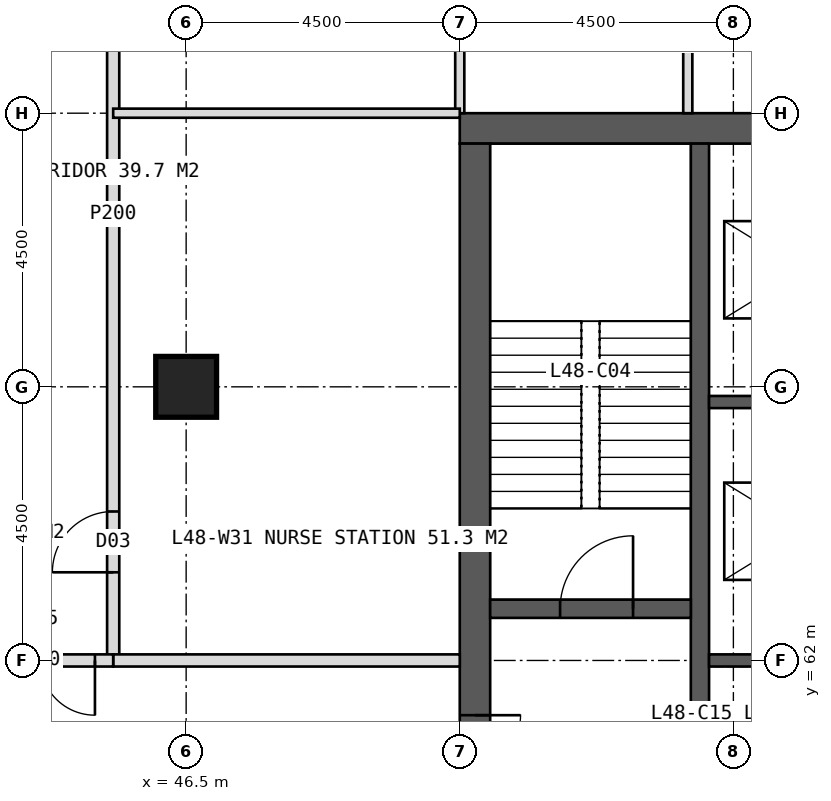
"""IFC4 building model, lengths in metres.
Left out: names, types, materials, properties, quantities, classifications, styles, units other than length and angle.
Written with IfcOpenShell. Run it as: python <this file> out.ifc"""

import sys

from ifc_helpers import new_model, si_unit, direction, frame, frame_2d, origin, origin_2d, place, context, subcontext, project, spatial, rectangle, hollow_rectangle, extrude, element, fill, save


model = new_model("IFC4")
c1 = context("Model", 3, precision=1e-05, world=origin(), true_north=direction((0.0, 1.0)))
c2 = subcontext(c1, "Body", "Model", "MODEL_VIEW")
j1 = project(units=[si_unit("LENGTHUNIT", "METRE"), si_unit("PLANEANGLEUNIT", "RADIAN")], contexts=[c1])
p1 = place(None, origin())
s1 = spatial("IfcSite", under=j1, at=p1, CompositionType="ELEMENT")
p2 = place(p1, origin())
s2 = spatial("IfcBuilding", under=s1, at=p2, CompositionType="ELEMENT")
p3 = place(p2, frame((0.0, 0.0, 201.0)))
s3 = spatial("IfcBuildingStorey", under=s2, at=p3, CompositionType="ELEMENT", Elevation=201.0)
p4 = place(p3, frame((51.0, 70.75, 0.0), z_axis=(0.0, 0.0, 1.0), x_axis=(1.0, 0.0, 0.0)))
e1 = element("IfcWall", 1, at=p4, inside=s3, PredefinedType="SHEAR", context=c2, shape_type="SweptSolid", body=[
    extrude(rectangle(XDim=18.0, YDim=0.5, at=frame_2d((9.0, 0.0))), origin(), (0.0, 0.0, 1.0), 4.0),
])
p5 = place(p4, frame((8.1, 0.0, 0.0)))
e2 = element("IfcOpeningElement", 2, at=p5, cuts=e1, PredefinedType="OPENING", context=c2, shape_type="SweptSolid", body=[
    extrude(rectangle(XDim=1.8, YDim=2.2, at=frame_2d((0.9, 1.1))), frame((0.0, 0.26, 0.0), z_axis=(0.0, -1.0, 0.0), x_axis=(1.0, 0.0, 0.0)), (0.0, 0.0, 1.0), 0.52),
])
p6 = place(p3, frame((51.25, 53.5, 0.0), z_axis=(0.0, 0.0, 1.0), x_axis=(0.0, 1.0, 0.0)))
e3 = element("IfcWall", 3, at=p6, inside=s3, PredefinedType="SHEAR", context=c2, shape_type="SweptSolid", body=[
    extrude(rectangle(XDim=17.0, YDim=0.5, at=frame_2d((8.5, 0.0))), origin(), (0.0, 0.0, 1.0), 4.0),
])
p7 = place(p6, frame((6.1, 0.0, 0.0)))
e4 = element("IfcOpeningElement", 4, at=p7, cuts=e3, PredefinedType="OPENING", context=c2, shape_type="SweptSolid", body=[
    extrude(rectangle(XDim=1.5, YDim=2.2, at=frame_2d((0.75, 1.1))), frame((0.0, 0.26, 0.0), z_axis=(0.0, -1.0, 0.0), x_axis=(1.0, 0.0, 0.0)), (0.0, 0.0, 1.0), 0.52),
])
p8 = place(p3, frame((54.95, 53.5, 0.0), z_axis=(0.0, 0.0, 1.0), x_axis=(0.0, 1.0, 0.0)))
e5 = element("IfcWall", 5, at=p8, inside=s3, PredefinedType="SHEAR", context=c2, shape_type="SweptSolid", body=[
    extrude(rectangle(XDim=17.0, YDim=0.3, at=frame_2d((8.5, 0.0))), origin(), (0.0, 0.0, 1.0), 4.0),
])
for number, where, z_axis, x_axis in (
    (6, (55.1, 62.0, 0.0), (0.0, 0.0, 1.0), (1.0, 0.0, 0.0)),
    (7, (55.1, 66.25, 0.0), (0.0, 0.0, 1.0), (1.0, 0.0, 0.0)),
):
    element("IfcWall", number, at=place(p3, frame(where, z_axis=z_axis, x_axis=x_axis)), inside=s3, PredefinedType="SHEAR", context=c2, shape_type="SweptSolid", body=[
        extrude(rectangle(XDim=3.05, YDim=0.2, at=frame_2d((1.525, 0.0))), origin(), (0.0, 0.0, 1.0), 4.0),
    ])
p9 = place(p3, frame((51.5, 62.85, 0.0), z_axis=(0.0, 0.0, 1.0), x_axis=(1.0, 0.0, 0.0)))
e8 = element("IfcWall", 8, at=p9, inside=s3, PredefinedType="SHEAR", context=c2, shape_type="SweptSolid", body=[
    extrude(rectangle(XDim=3.3, YDim=0.3, at=frame_2d((1.65, 0.0))), origin(), (0.0, 0.0, 1.0), 4.0),
])
p10 = place(p9, frame((1.15, 0.0, 0.0)))
e9 = element("IfcOpeningElement", 9, at=p10, cuts=e8, PredefinedType="OPENING", context=c2, shape_type="SweptSolid", body=[
    extrude(rectangle(XDim=1.2, YDim=2.1, at=frame_2d((0.6, 1.05))), frame((0.0, 0.16, 0.0), z_axis=(0.0, -1.0, 0.0), x_axis=(1.0, 0.0, 0.0)), (0.0, 0.0, 1.0), 0.32),
])
p11 = place(p3, frame((46.5, 66.5, 0.0), z_axis=(0.0, 0.0, 1.0), x_axis=(1.0, 0.0, 0.0)))
e10 = element("IfcColumn", 10, at=p11, inside=s3, PredefinedType="COLUMN", context=c2, shape_type="SweptSolid", body=[
    extrude(hollow_rectangle(XDim=1.0, YDim=1.0, WallThickness=0.1, at=origin_2d()), origin(), (0.0, 0.0, 1.0), 4.0),
])
p12 = place(p3, frame((51.0, 71.0, 0.0), z_axis=(0.0, 0.0, 1.0), x_axis=(0.0, 1.0, 0.0)))
e11 = element("IfcWall", 11, at=p12, inside=s3, PredefinedType="PARTITIONING", context=c2, shape_type="SweptSolid", body=[
    extrude(rectangle(XDim=5.7, YDim=0.15, at=frame_2d((2.85, 0.0))), origin(), (0.0, 0.0, 1.0), 3.75),
])
p13 = place(p3, frame((54.75, 71.0, 0.0), z_axis=(0.0, 0.0, 1.0), x_axis=(0.0, 1.0, 0.0)))
e12 = element("IfcWall", 12, at=p13, inside=s3, PredefinedType="PARTITIONING", context=c2, shape_type="SweptSolid", body=[
    extrude(rectangle(XDim=2.4, YDim=0.15, at=frame_2d((1.2, 0.0))), origin(), (0.0, 0.0, 1.0), 3.75),
])
p14 = place(p3, frame((45.3, 62.0, 0.0), z_axis=(0.0, 0.0, 1.0), x_axis=(0.0, 1.0, 0.0)))
e13 = element("IfcWall", 13, at=p14, inside=s3, PredefinedType="PARTITIONING", context=c2, shape_type="SweptSolid", body=[
    extrude(rectangle(XDim=14.7, YDim=0.2, at=frame_2d((7.35, 0.0))), origin(), (0.0, 0.0, 1.0), 3.75),
])
p15 = place(p14, frame((1.45, 0.0, 0.0)))
e14 = element("IfcOpeningElement", 14, at=p15, cuts=e13, PredefinedType="OPENING", context=c2, shape_type="SweptSolid", body=[
    extrude(rectangle(XDim=1.0, YDim=2.1, at=frame_2d((0.5, 1.05))), frame((0.0, 0.11, 0.0), z_axis=(0.0, -1.0, 0.0), x_axis=(1.0, 0.0, 0.0)), (0.0, 0.0, 1.0), 0.22),
])
p16 = place(p14, frame((11.35, 0.0, 0.0)))
e15 = element("IfcOpeningElement", 15, at=p16, cuts=e13, PredefinedType="OPENING", context=c2, shape_type="SweptSolid", body=[
    extrude(rectangle(XDim=1.0, YDim=2.1, at=frame_2d((0.5, 1.05))), frame((0.0, 0.11, 0.0), z_axis=(0.0, -1.0, 0.0), x_axis=(1.0, 0.0, 0.0)), (0.0, 0.0, 1.0), 0.22),
])
p17 = place(p3, frame((51.0, 62.0, 0.0), z_axis=(0.0, 0.0, 1.0), x_axis=(-1.0, 0.0, 0.0)))
e16 = element("IfcWall", 16, at=p17, inside=s3, PredefinedType="SOLIDWALL", context=c2, shape_type="SweptSolid", body=[
    extrude(rectangle(XDim=5.7, YDim=0.2, at=frame_2d((2.85, 0.0))), origin(), (0.0, 0.0, 1.0), 2.95),
])
p18 = place(p3, frame((51.0, 71.0, 0.0), z_axis=(0.0, 0.0, 1.0), x_axis=(-1.0, 0.0, 0.0)))
e17 = element("IfcWall", 17, at=p18, inside=s3, PredefinedType="PARTITIONING", context=c2, shape_type="SweptSolid", body=[
    extrude(rectangle(XDim=5.7, YDim=0.15, at=frame_2d((2.85, 0.0))), origin(), (0.0, 0.0, 1.0), 3.75),
])
p19 = place(p3, frame((45.3, 62.0, 0.0), z_axis=(0.0, 0.0, 1.0), x_axis=(-1.0, 0.0, 0.0)))
e18 = element("IfcWall", 18, at=p19, inside=s3, PredefinedType="SOLIDWALL", context=c2, shape_type="SweptSolid", body=[
    extrude(rectangle(XDim=2.7, YDim=0.2, at=frame_2d((1.35, 0.0))), origin(), (0.0, 0.0, 1.0), 2.95),
])
p20 = place(p19, frame((0.3, 0.0, 0.0)))
e19 = element("IfcOpeningElement", 19, at=p20, cuts=e18, PredefinedType="OPENING", context=c2, shape_type="SweptSolid", body=[
    extrude(rectangle(XDim=1.8, YDim=2.2, at=frame_2d((0.9, 1.1))), frame((0.0, 0.11, 0.0), z_axis=(0.0, -1.0, 0.0), x_axis=(1.0, 0.0, 0.0)), (0.0, 0.0, 1.0), 0.22),
])
p21 = place(p15, origin())
e20 = element("IfcDoor", 20, at=p21, inside=s3, OperationType="SINGLE_SWING_LEFT", PredefinedType="DOOR", context=c2, shape_type="SweptSolid", body=[
    extrude(rectangle(XDim=1.0, YDim=2.1, at=frame_2d((0.5, 1.05))), frame((0.0, 0.025, 0.0), z_axis=(0.0, -1.0, 0.0), x_axis=(1.0, 0.0, 0.0)), (0.0, 0.0, 1.0), 0.05),
])
fill(e14, e20)
p22 = place(p20, origin())
e21 = element("IfcDoor", 21, at=p22, inside=s3, OperationType="DOUBLE_DOOR_DOUBLE_SWING", PredefinedType="DOOR", context=c2, shape_type="SweptSolid", body=[
    extrude(rectangle(XDim=1.8, YDim=2.2, at=frame_2d((0.9, 1.1))), frame((0.0, 0.025, 0.0), z_axis=(0.0, -1.0, 0.0), x_axis=(1.0, 0.0, 0.0)), (0.0, 0.0, 1.0), 0.05),
])
fill(e19, e21)
p23 = place(p7, origin())
e22 = element("IfcDoor", 22, at=p23, inside=s3, OperationType="DOUBLE_DOOR_SINGLE_SWING", PredefinedType="DOOR", context=c2, shape_type="SweptSolid", body=[
    extrude(rectangle(XDim=1.5, YDim=2.2, at=frame_2d((0.75, 1.1))), frame((0.0, 0.025, 0.0), z_axis=(0.0, -1.0, 0.0), x_axis=(1.0, 0.0, 0.0)), (0.0, 0.0, 1.0), 0.05),
])
fill(e4, e22)
p24 = place(p10, origin())
e23 = element("IfcDoor", 23, at=p24, inside=s3, OperationType="SINGLE_SWING_RIGHT", PredefinedType="DOOR", context=c2, shape_type="SweptSolid", body=[
    extrude(rectangle(XDim=1.2, YDim=2.1, at=frame_2d((0.6, 1.05))), frame((0.0, 0.025, 0.0), z_axis=(0.0, -1.0, 0.0), x_axis=(1.0, 0.0, 0.0)), (0.0, 0.0, 1.0), 0.05),
])
fill(e9, e23)
save(model, sys.argv[1])
